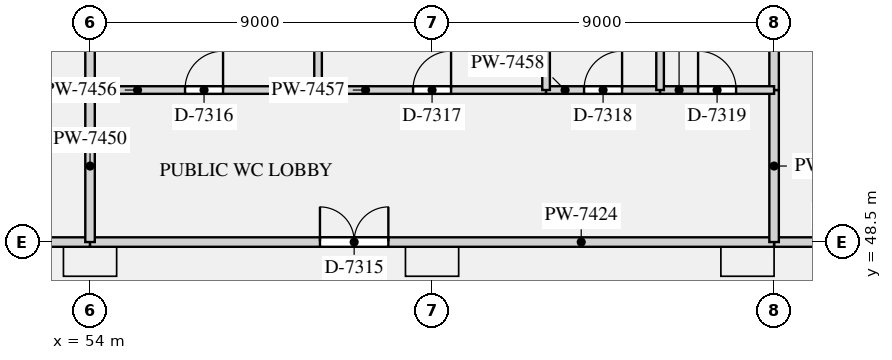
"""IFC4 building model, lengths in metres.
Left out: names, types, materials, properties, quantities, classifications, styles, units other than length and angle.
Written with IfcOpenShell. Run it as: python <this file> out.ifc"""

import sys

from ifc_helpers import new_model, si_unit, direction, frame, frame_2d, origin, origin_2d, place, context, subcontext, project, spatial, rectangle, extrude, element, fill, save


model = new_model("IFC4")
c1 = context("Model", 3, precision=1e-05, world=origin(), true_north=direction((0.0, 1.0)))
c2 = subcontext(c1, "Body", "Model", "MODEL_VIEW")
j1 = project(units=[si_unit("LENGTHUNIT", "METRE"), si_unit("PLANEANGLEUNIT", "RADIAN")], contexts=[c1])
p1 = place(None, origin())
s1 = spatial("IfcSite", under=j1, at=p1, CompositionType="ELEMENT")
p2 = place(p1, origin())
s2 = spatial("IfcBuilding", under=s1, at=p2, CompositionType="ELEMENT")
p3 = place(p2, frame((0.0, 0.0, 6.5)))
s3 = spatial("IfcBuildingStorey", under=s2, at=p3, CompositionType="ELEMENT", Elevation=6.5)
for number, where, z_axis, x_axis in (
    (1, (71.3, 48.05, 0.0), (0.0, 0.0, 1.0), (-1.0, 0.0, 0.0)),
    (2, (63.0, 48.05, 0.0), (0.0, 0.0, 1.0), (-1.0, 0.0, 0.0)),
    (3, (54.0, 48.05, 0.0), (0.0, 0.0, 1.0), (-1.0, 0.0, 0.0)),
):
    element("IfcColumn", number, at=place(p3, frame(where, z_axis=z_axis, x_axis=x_axis)), inside=s3, PredefinedType="USERDEFINED", context=c2, shape_type="SweptSolid", body=[
        extrude(rectangle(XDim=1.4, YDim=0.9, at=origin_2d()), origin(), (0.0, 0.0, 1.0), 4.5),
    ])
p4 = place(p3, frame((45.0, 48.5, 0.0), z_axis=(0.0, 0.0, 1.0), x_axis=(1.0, 0.0, 0.0)))
e4 = element("IfcWall", 4, at=p4, inside=s3, PredefinedType="PARTITIONING", context=c2, shape_type="SweptSolid", body=[
    extrude(rectangle(XDim=9.0, YDim=0.25, at=frame_2d((4.5, 0.0))), origin(), (0.0, 0.0, 1.0), 4.098),
])
p5 = place(p4, frame((4.0, 0.0, 0.0)))
e5 = element("IfcOpeningElement", 5, at=p5, cuts=e4, PredefinedType="OPENING", context=c2, shape_type="SweptSolid", body=[
    extrude(rectangle(XDim=1.0, YDim=2.1, at=frame_2d((0.5, 1.05))), frame((0.0, 0.135, 0.0), z_axis=(0.0, -1.0, 0.0), x_axis=(1.0, 0.0, 0.0)), (0.0, 0.0, 1.0), 0.27),
])
p6 = place(p3, frame((72.0, 48.5, 0.0), z_axis=(0.0, 0.0, 1.0), x_axis=(1.0, 0.0, 0.0)))
e6 = element("IfcWall", 6, at=p6, inside=s3, PredefinedType="PARTITIONING", context=c2, shape_type="SweptSolid", body=[
    extrude(rectangle(XDim=9.0, YDim=0.25, at=frame_2d((4.5, 0.0))), origin(), (0.0, 0.0, 1.0), 4.098),
])
p7 = place(p6, frame((4.0, 0.0, 0.0)))
e7 = element("IfcOpeningElement", 7, at=p7, cuts=e6, PredefinedType="OPENING", context=c2, shape_type="SweptSolid", body=[
    extrude(rectangle(XDim=1.0, YDim=2.1, at=frame_2d((0.5, 1.05))), frame((0.0, 0.135, 0.0), z_axis=(0.0, -1.0, 0.0), x_axis=(1.0, 0.0, 0.0)), (0.0, 0.0, 1.0), 0.27),
])
p8 = place(p3, frame((54.0, 48.5, 0.0), z_axis=(0.0, 0.0, 1.0), x_axis=(1.0, 0.0, 0.0)))
e8 = element("IfcWall", 8, at=p8, inside=s3, PredefinedType="PARTITIONING", context=c2, shape_type="SweptSolid", body=[
    extrude(rectangle(XDim=18.0, YDim=0.25, at=frame_2d((9.0, 0.0))), origin(), (0.0, 0.0, 1.0), 4.098),
])
p9 = place(p8, frame((6.05, 0.0, 0.0)))
e9 = element("IfcOpeningElement", 9, at=p9, cuts=e8, PredefinedType="OPENING", context=c2, shape_type="SweptSolid", body=[
    extrude(rectangle(XDim=1.8, YDim=2.4, at=frame_2d((0.9, 1.2))), frame((0.0, 0.135, 0.0), z_axis=(0.0, -1.0, 0.0), x_axis=(1.0, 0.0, 0.0)), (0.0, 0.0, 1.0), 0.27),
])
p10 = place(p3, frame((54.0, 48.5, 0.0), z_axis=(0.0, 0.0, 1.0), x_axis=(0.0, 1.0, 0.0)))
e10 = element("IfcWall", 10, at=p10, inside=s3, PredefinedType="PARTITIONING", context=c2, shape_type="SweptSolid", body=[
    extrude(rectangle(XDim=4.0, YDim=0.25, at=frame_2d((2.0, 0.0))), origin(), (0.0, 0.0, 1.0), 4.098),
])
p11 = place(p3, frame((54.0, 52.5, 0.0), z_axis=(0.0, 0.0, 1.0), x_axis=(0.0, 1.0, 0.0)))
e11 = element("IfcWall", 11, at=p11, inside=s3, PredefinedType="PARTITIONING", context=c2, shape_type="SweptSolid", body=[
    extrude(rectangle(XDim=6.0, YDim=0.25, at=frame_2d((3.0, 0.0))), origin(), (0.0, 0.0, 1.0), 4.098),
])
p12 = place(p3, frame((72.0, 48.5, 0.0), z_axis=(0.0, 0.0, 1.0), x_axis=(0.0, 1.0, 0.0)))
e12 = element("IfcWall", 12, at=p12, inside=s3, PredefinedType="PARTITIONING", context=c2, shape_type="SweptSolid", body=[
    extrude(rectangle(XDim=4.0, YDim=0.25, at=frame_2d((2.0, 0.0))), origin(), (0.0, 0.0, 1.0), 4.098),
])
p13 = place(p3, frame((72.0, 52.5, 0.0), z_axis=(0.0, 0.0, 1.0), x_axis=(0.0, 1.0, 0.0)))
e13 = element("IfcWall", 13, at=p13, inside=s3, PredefinedType="PARTITIONING", context=c2, shape_type="SweptSolid", body=[
    extrude(rectangle(XDim=6.0, YDim=0.25, at=frame_2d((3.0, 0.0))), origin(), (0.0, 0.0, 1.0), 4.098),
])
p14 = place(p3, frame((54.0, 52.5, 0.0), z_axis=(0.0, 0.0, 1.0), x_axis=(1.0, 0.0, 0.0)))
e14 = element("IfcWall", 14, at=p14, inside=s3, PredefinedType="PARTITIONING", context=c2, shape_type="SweptSolid", body=[
    extrude(rectangle(XDim=6.0, YDim=0.2, at=frame_2d((3.0, 0.0))), origin(), (0.0, 0.0, 1.0), 4.098),
])
p15 = place(p14, frame((2.5, 0.0, 0.0)))
e15 = element("IfcOpeningElement", 15, at=p15, cuts=e14, PredefinedType="OPENING", context=c2, shape_type="SweptSolid", body=[
    extrude(rectangle(XDim=1.0, YDim=2.1, at=frame_2d((0.5, 1.05))), frame((0.0, 0.11, 0.0), z_axis=(0.0, -1.0, 0.0), x_axis=(1.0, 0.0, 0.0)), (0.0, 0.0, 1.0), 0.22),
])
p16 = place(p3, frame((60.0, 52.5, 0.0), z_axis=(0.0, 0.0, 1.0), x_axis=(1.0, 0.0, 0.0)))
e16 = element("IfcWall", 16, at=p16, inside=s3, PredefinedType="PARTITIONING", context=c2, shape_type="SweptSolid", body=[
    extrude(rectangle(XDim=6.0, YDim=0.2, at=frame_2d((3.0, 0.0))), origin(), (0.0, 0.0, 1.0), 4.098),
])
p17 = place(p16, frame((2.5, 0.0, 0.0)))
e17 = element("IfcOpeningElement", 17, at=p17, cuts=e16, PredefinedType="OPENING", context=c2, shape_type="SweptSolid", body=[
    extrude(rectangle(XDim=1.0, YDim=2.1, at=frame_2d((0.5, 1.05))), frame((0.0, 0.11, 0.0), z_axis=(0.0, -1.0, 0.0), x_axis=(1.0, 0.0, 0.0)), (0.0, 0.0, 1.0), 0.22),
])
p18 = place(p3, frame((66.0, 52.5, 0.0), z_axis=(0.0, 0.0, 1.0), x_axis=(1.0, 0.0, 0.0)))
e18 = element("IfcWall", 18, at=p18, inside=s3, PredefinedType="PARTITIONING", context=c2, shape_type="SweptSolid", body=[
    extrude(rectangle(XDim=3.0, YDim=0.2, at=frame_2d((1.5, 0.0))), origin(), (0.0, 0.0, 1.0), 4.098),
])
p19 = place(p18, frame((1.0, 0.0, 0.0)))
e19 = element("IfcOpeningElement", 19, at=p19, cuts=e18, PredefinedType="OPENING", context=c2, shape_type="SweptSolid", body=[
    extrude(rectangle(XDim=1.0, YDim=2.1, at=frame_2d((0.5, 1.05))), frame((0.0, 0.11, 0.0), z_axis=(0.0, -1.0, 0.0), x_axis=(1.0, 0.0, 0.0)), (0.0, 0.0, 1.0), 0.22),
])
p20 = place(p3, frame((69.0, 52.5, 0.0), z_axis=(0.0, 0.0, 1.0), x_axis=(1.0, 0.0, 0.0)))
e20 = element("IfcWall", 20, at=p20, inside=s3, PredefinedType="PARTITIONING", context=c2, shape_type="SweptSolid", body=[
    extrude(rectangle(XDim=3.0, YDim=0.2, at=frame_2d((1.5, 0.0))), origin(), (0.0, 0.0, 1.0), 4.098),
])
p21 = place(p20, frame((1.0, 0.0, 0.0)))
e21 = element("IfcOpeningElement", 21, at=p21, cuts=e20, PredefinedType="OPENING", context=c2, shape_type="SweptSolid", body=[
    extrude(rectangle(XDim=1.0, YDim=2.1, at=frame_2d((0.5, 1.05))), frame((0.0, 0.11, 0.0), z_axis=(0.0, -1.0, 0.0), x_axis=(1.0, 0.0, 0.0)), (0.0, 0.0, 1.0), 0.22),
])
for number, where, z_axis, x_axis in (
    (22, (60.0, 52.5, 0.0), (0.0, 0.0, 1.0), (0.0, 1.0, 0.0)),
    (23, (66.0, 52.5, 0.0), (0.0, 0.0, 1.0), (0.0, 1.0, 0.0)),
    (24, (69.0, 52.5, 0.0), (0.0, 0.0, 1.0), (0.0, 1.0, 0.0)),
):
    element("IfcWall", number, at=place(p3, frame(where, z_axis=z_axis, x_axis=x_axis)), inside=s3, PredefinedType="PARTITIONING", context=c2, shape_type="SweptSolid", body=[
        extrude(rectangle(XDim=6.0, YDim=0.2, at=frame_2d((3.0, 0.0))), origin(), (0.0, 0.0, 1.0), 4.098),
    ])
p22 = place(p9, origin())
e25 = element("IfcDoor", 25, at=p22, inside=s3, OperationType="DOUBLE_DOOR_SINGLE_SWING", PredefinedType="DOOR", context=c2, shape_type="SweptSolid", body=[
    extrude(rectangle(XDim=1.8, YDim=2.4, at=frame_2d((0.9, 1.2))), frame((0.0, 0.025, 0.0), z_axis=(0.0, -1.0, 0.0), x_axis=(1.0, 0.0, 0.0)), (0.0, 0.0, 1.0), 0.05),
])
fill(e9, e25)
p23 = place(p15, origin())
e26 = element("IfcDoor", 26, at=p23, inside=s3, OperationType="SINGLE_SWING_RIGHT", PredefinedType="DOOR", context=c2, shape_type="SweptSolid", body=[
    extrude(rectangle(XDim=1.0, YDim=2.1, at=frame_2d((0.5, 1.05))), frame((0.0, 0.025, 0.0), z_axis=(0.0, -1.0, 0.0), x_axis=(1.0, 0.0, 0.0)), (0.0, 0.0, 1.0), 0.05),
])
fill(e15, e26)
p24 = place(p17, origin())
e27 = element("IfcDoor", 27, at=p24, inside=s3, OperationType="SINGLE_SWING_RIGHT", PredefinedType="DOOR", context=c2, shape_type="SweptSolid", body=[
    extrude(rectangle(XDim=1.0, YDim=2.1, at=frame_2d((0.5, 1.05))), frame((0.0, 0.025, 0.0), z_axis=(0.0, -1.0, 0.0), x_axis=(1.0, 0.0, 0.0)), (0.0, 0.0, 1.0), 0.05),
])
fill(e17, e27)
p25 = place(p19, origin())
e28 = element("IfcDoor", 28, at=p25, inside=s3, OperationType="SINGLE_SWING_RIGHT", PredefinedType="DOOR", context=c2, shape_type="SweptSolid", body=[
    extrude(rectangle(XDim=1.0, YDim=2.1, at=frame_2d((0.5, 1.05))), frame((0.0, 0.025, 0.0), z_axis=(0.0, -1.0, 0.0), x_axis=(1.0, 0.0, 0.0)), (0.0, 0.0, 1.0), 0.05),
])
fill(e19, e28)
p26 = place(p21, origin())
e29 = element("IfcDoor", 29, at=p26, inside=s3, OperationType="SINGLE_SWING_LEFT", PredefinedType="DOOR", context=c2, shape_type="SweptSolid", body=[
    extrude(rectangle(XDim=1.0, YDim=2.1, at=frame_2d((0.5, 1.05))), frame((0.0, 0.025, 0.0), z_axis=(0.0, -1.0, 0.0), x_axis=(1.0, 0.0, 0.0)), (0.0, 0.0, 1.0), 0.05),
])
fill(e21, e29)
save(model, sys.argv[1])
